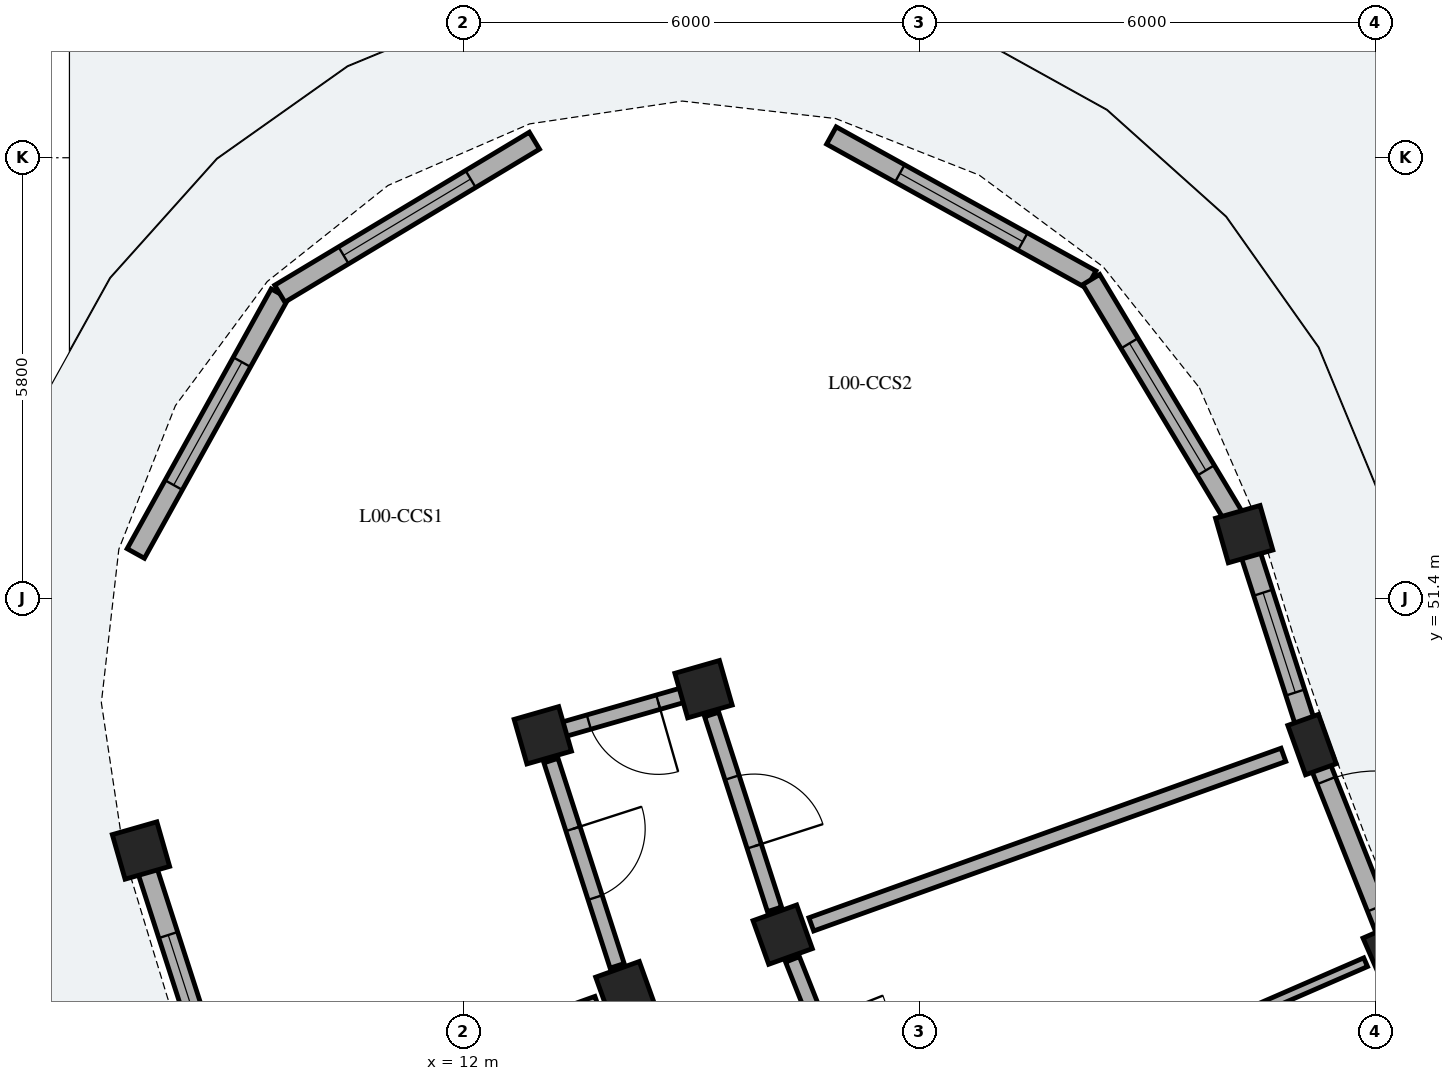
"""IFC4 building model, lengths in metres.
Left out: names, types, materials, properties, quantities, classifications, styles, units other than length and angle.
Written with IfcOpenShell. Run it as: python <this file> out.ifc"""

import sys

from ifc_helpers import new_model, si_unit, direction, frame, frame_2d, origin, origin_2d, place, context, subcontext, project, spatial, rectangle, extrude, element, fill, save


model = new_model("IFC4")
c1 = context("Model", 3, precision=1e-05, world=origin(), true_north=direction((0.0, 1.0)))
c2 = subcontext(c1, "Body", "Model", "MODEL_VIEW")
j1 = project(units=[si_unit("LENGTHUNIT", "METRE"), si_unit("PLANEANGLEUNIT", "RADIAN")], contexts=[c1])
p1 = place(None, origin())
s1 = spatial("IfcSite", under=j1, at=p1, CompositionType="ELEMENT")
p2 = place(p1, origin())
s2 = spatial("IfcBuilding", under=s1, at=p2, CompositionType="ELEMENT")
p3 = place(p2, origin())
s3 = spatial("IfcBuildingStorey", under=s2, at=p3, CompositionType="ELEMENT", Elevation=0.0)
for number, where, z_axis, x_axis in (
    (1, (22.272, 52.248, 0.0), (0.0, 0.0, 1.0), (-0.961, -0.276, 0.0)),
    (2, (15.159, 50.208, 0.0), (0.0, 0.0, 1.0), (-0.961, -0.276, 0.0)),
    (3, (13.044, 49.602, 0.0), (0.0, 0.0, 1.0), (-0.961, -0.276, 0.0)),
    (4, (7.757, 48.086, 0.0), (0.0, 0.0, 1.0), (-0.961, -0.276, 0.0)),
):
    element("IfcColumn", number, at=place(p3, frame(where, z_axis=z_axis, x_axis=x_axis)), inside=s3, PredefinedType="COLUMN", context=c2, shape_type="SweptSolid", body=[
        extrude(rectangle(XDim=0.61, YDim=0.61, at=origin_2d()), origin(), (0.0, 0.0, 1.0), 4.485),
    ])
p4 = place(p3, frame((23.165, 49.479, 0.0), z_axis=(0.0, 0.0, 1.0), x_axis=(-0.941176015256, -0.337916718003, 0.0)))
e5 = element("IfcColumn", 5, at=p4, inside=s3, PredefinedType="PILASTER", context=c2, shape_type="SweptSolid", body=[
    extrude(rectangle(XDim=0.43, YDim=0.69, at=origin_2d()), origin(), (0.0, 0.0, 1.0), 4.485),
])
for number, where, z_axis, x_axis in (
    (6, (16.2, 46.979, 0.0), (0.0, 0.0, 1.0), (-0.941, -0.338, 0.0)),
    (7, (14.129, 46.236, 0.0), (0.0, 0.0, 1.0), (-0.941, -0.338, 0.0)),
    (8, (24.237, 46.776, 0.0), (0.0, 0.0, 1.0), (-0.917, -0.399, 0.0)),
):
    element("IfcColumn", number, at=place(p3, frame(where, z_axis=z_axis, x_axis=x_axis)), inside=s3, PredefinedType="COLUMN", context=c2, shape_type="SweptSolid", body=[
        extrude(rectangle(XDim=0.61, YDim=0.61, at=origin_2d()), origin(), (0.0, 0.0, 1.0), 4.485),
    ])
p5 = place(p3, frame((7.841, 47.824, 0.0), z_axis=(0.0, 0.0, 1.0), x_axis=(0.306963342814, -0.951721338506, 0.0)))
e9 = element("IfcWall", 9, at=p5, inside=s3, PredefinedType="SOLIDWALL", context=c2, shape_type="SweptSolid", body=[
    extrude(rectangle(XDim=3.437, YDim=0.26, at=frame_2d((1.718, 0.0))), origin(), (0.0, 0.0, 1.0), 3.755),
])
p6 = place(p5, frame((0.893, 0.0, 0.55)))
e10 = element("IfcOpeningElement", 10, at=p6, cuts=e9, PredefinedType="OPENING", context=c2, shape_type="SweptSolid", body=[
    extrude(rectangle(XDim=1.65, YDim=1.8, at=frame_2d((0.825, 0.9))), frame((0.0, 0.14, 0.0), z_axis=(0.0, -1.0, 0.0), x_axis=(1.0, 0.0, 0.0)), (0.0, 0.0, 1.0), 0.28),
])
p7 = place(p3, frame((22.356, 51.986, 0.0), z_axis=(0.0, 0.0, 1.0), x_axis=(0.306909552229, -0.951738686169, 0.0)))
e11 = element("IfcWall", 11, at=p7, inside=s3, PredefinedType="SOLIDWALL", context=c2, shape_type="SweptSolid", body=[
    extrude(rectangle(XDim=2.448, YDim=0.26, at=frame_2d((1.224, 0.0))), origin(), (0.0, 0.0, 1.0), 3.755),
])
p8 = place(p7, frame((0.534, 0.0, 0.55)))
e12 = element("IfcOpeningElement", 12, at=p8, cuts=e11, PredefinedType="OPENING", context=c2, shape_type="SweptSolid", body=[
    extrude(rectangle(XDim=1.38, YDim=1.56, at=frame_2d((0.69, 0.78))), frame((0.0, 0.14, 0.0), z_axis=(0.0, -1.0, 0.0), x_axis=(1.0, 0.0, 0.0)), (0.0, 0.0, 1.0), 0.28),
])
p9 = place(p3, frame((23.233, 49.308, 0.0), z_axis=(0.0, 0.0, 1.0), x_axis=(0.368500941406, -0.92962737491, 0.0)))
e13 = element("IfcWall", 13, at=p9, inside=s3, PredefinedType="SOLIDWALL", context=c2, shape_type="SweptSolid", body=[
    extrude(rectangle(XDim=2.449, YDim=0.26, at=frame_2d((1.224, 0.0))), origin(), (0.0, 0.0, 1.0), 3.755),
])
p10 = place(p9, frame((0.324, 0.0, 0.0)))
e14 = element("IfcOpeningElement", 14, at=p10, cuts=e13, PredefinedType="OPENING", context=c2, shape_type="SweptSolid", body=[
    extrude(rectangle(XDim=1.8, YDim=2.15, at=frame_2d((0.9, 1.075))), frame((0.0, 0.14, 0.0), z_axis=(0.0, -1.0, 0.0), x_axis=(1.0, 0.0, 0.0)), (0.0, 0.0, 1.0), 0.28),
])
p11 = place(p3, frame((7.689, 51.993, 0.0), z_axis=(0.0, 0.0, 1.0), x_axis=(0.48481530532, 0.874616555828, 0.0)))
e15 = element("IfcWall", 15, at=p11, inside=s3, PredefinedType="SOLIDWALL", context=c2, shape_type="SweptSolid", body=[
    extrude(rectangle(XDim=3.908, YDim=0.26, at=frame_2d((1.954, 0.0))), origin(), (0.0, 0.0, 1.0), 3.755),
])
p12 = place(p11, frame((1.029, 0.0, 0.4)))
e16 = element("IfcOpeningElement", 16, at=p12, cuts=e15, PredefinedType="OPENING", context=c2, shape_type="SweptSolid", body=[
    extrude(rectangle(XDim=1.85, YDim=1.72, at=frame_2d((0.925, 0.86))), frame((0.0, 0.14, 0.0), z_axis=(0.0, -1.0, 0.0), x_axis=(1.0, 0.0, 0.0)), (0.0, 0.0, 1.0), 0.28),
])
p13 = place(p3, frame((9.583, 55.412, 0.0), z_axis=(0.0, 0.0, 1.0), x_axis=(0.857178568309, 0.515019321998, 0.0)))
e17 = element("IfcWall", 17, at=p13, inside=s3, PredefinedType="SOLIDWALL", context=c2, shape_type="SweptSolid", body=[
    extrude(rectangle(XDim=3.908, YDim=0.26, at=frame_2d((1.954, 0.0))), origin(), (0.0, 0.0, 1.0), 3.755),
])
p14 = place(p13, frame((0.979, 0.0, 0.4)))
e18 = element("IfcOpeningElement", 18, at=p14, cuts=e17, PredefinedType="OPENING", context=c2, shape_type="SweptSolid", body=[
    extrude(rectangle(XDim=1.95, YDim=1.78, at=frame_2d((0.975, 0.89))), frame((0.0, 0.14, 0.0), z_axis=(0.0, -1.0, 0.0), x_axis=(1.0, 0.0, 0.0)), (0.0, 0.0, 1.0), 0.28),
])
p15 = place(p3, frame((16.841, 57.493, 0.0), z_axis=(0.0, 0.0, 1.0), x_axis=(0.874616555828, -0.48481530532, 0.0)))
e19 = element("IfcWall", 19, at=p15, inside=s3, PredefinedType="SOLIDWALL", context=c2, shape_type="SweptSolid", body=[
    extrude(rectangle(XDim=3.908, YDim=0.26, at=frame_2d((1.954, 0.0))), origin(), (0.0, 0.0, 1.0), 3.755),
])
p16 = place(p15, frame((1.029, 0.0, 0.4)))
e20 = element("IfcOpeningElement", 20, at=p16, cuts=e19, PredefinedType="OPENING", context=c2, shape_type="SweptSolid", body=[
    extrude(rectangle(XDim=1.85, YDim=1.72, at=frame_2d((0.925, 0.86))), frame((0.0, 0.14, 0.0), z_axis=(0.0, -1.0, 0.0), x_axis=(1.0, 0.0, 0.0)), (0.0, 0.0, 1.0), 0.28),
])
p17 = place(p3, frame((20.259, 55.598, 0.0), z_axis=(0.0, 0.0, 1.0), x_axis=(0.515037642827, -0.857167560324, 0.0)))
e21 = element("IfcWall", 21, at=p17, inside=s3, PredefinedType="SOLIDWALL", context=c2, shape_type="SweptSolid", body=[
    extrude(rectangle(XDim=3.908, YDim=0.26, at=frame_2d((1.954, 0.0))), origin(), (0.0, 0.0, 1.0), 3.755),
])
p18 = place(p17, frame((0.979, 0.0, 0.4)))
e22 = element("IfcOpeningElement", 22, at=p18, cuts=e21, PredefinedType="OPENING", context=c2, shape_type="SweptSolid", body=[
    extrude(rectangle(XDim=1.95, YDim=1.78, at=frame_2d((0.975, 0.89))), frame((0.0, 0.14, 0.0), z_axis=(0.0, -1.0, 0.0), x_axis=(1.0, 0.0, 0.0)), (0.0, 0.0, 1.0), 0.28),
])
p19 = place(p3, frame((13.151, 49.269, 0.0), z_axis=(0.0, 0.0, 1.0), x_axis=(0.30694495224, -0.951727269912, 0.0)))
e23 = element("IfcWall", 23, at=p19, inside=s3, PredefinedType="PARTITIONING", context=c2, shape_type="SweptSolid", body=[
    extrude(rectangle(XDim=2.837, YDim=0.195, at=frame_2d((1.418, 0.0))), origin(), (0.0, 0.0, 1.0), 3.1),
])
p20 = place(p19, frame((0.944, 0.0, 0.0)))
e24 = element("IfcOpeningElement", 24, at=p20, cuts=e23, PredefinedType="OPENING", context=c2, shape_type="SweptSolid", body=[
    extrude(rectangle(XDim=0.95, YDim=2.13, at=frame_2d((0.475, 1.065))), frame((0.0, 0.107, 0.0), z_axis=(0.0, -1.0, 0.0), x_axis=(1.0, 0.0, 0.0)), (0.0, 0.0, 1.0), 0.215),
])
p21 = place(p3, frame((15.266, 49.875, 0.0), z_axis=(0.0, 0.0, 1.0), x_axis=(0.306883578189, -0.951747061691, 0.0)))
e25 = element("IfcWall", 25, at=p21, inside=s3, PredefinedType="PARTITIONING", context=c2, shape_type="SweptSolid", body=[
    extrude(rectangle(XDim=2.693, YDim=0.195, at=frame_2d((1.346, 0.0))), origin(), (0.0, 0.0, 1.0), 3.1),
])
p22 = place(p21, frame((0.872, 0.0, 0.0)))
e26 = element("IfcOpeningElement", 26, at=p22, cuts=e25, PredefinedType="OPENING", context=c2, shape_type="SweptSolid", body=[
    extrude(rectangle(XDim=0.95, YDim=2.13, at=frame_2d((0.475, 1.065))), frame((0.0, 0.107, 0.0), z_axis=(0.0, -1.0, 0.0), x_axis=(1.0, 0.0, 0.0)), (0.0, 0.0, 1.0), 0.215),
])
p23 = place(p3, frame((13.753, 46.1, 0.0), z_axis=(0.0, 0.0, 1.0), x_axis=(-0.941182387398, -0.337898969591, 0.0)))
e27 = element("IfcWall", 27, at=p23, inside=s3, PredefinedType="PLUMBINGWALL", context=c2, shape_type="SweptSolid", body=[
    extrude(rectangle(XDim=4.7, YDim=0.14, at=frame_2d((2.35, 0.0))), origin(), (0.0, 0.0, 1.0), 3.1),
])
p24 = place(p23, frame((1.925, 0.0, 0.0)))
e28 = element("IfcOpeningElement", 28, at=p24, cuts=e27, PredefinedType="OPENING", context=c2, shape_type="SweptSolid", body=[
    extrude(rectangle(XDim=0.85, YDim=2.05, at=frame_2d((0.425, 1.025))), frame((0.0, 0.08, 0.0), z_axis=(0.0, -1.0, 0.0), x_axis=(1.0, 0.0, 0.0)), (0.0, 0.0, 1.0), 0.16),
])
p25 = place(p3, frame((22.788, 49.344, 0.0), z_axis=(0.0, 0.0, 1.0), x_axis=(-0.941179890997, -0.337905922978, 0.0)))
e29 = element("IfcWall", 29, at=p25, inside=s3, PredefinedType="PARTITIONING", context=c2, shape_type="SweptSolid", body=[
    extrude(rectangle(XDim=6.6, YDim=0.185, at=frame_2d((3.3, 0.0))), origin(), (0.0, 0.0, 1.0), 3.1),
])
p26 = place(p3, frame((16.329, 46.654, 0.0), z_axis=(0.0, 0.0, 1.0), x_axis=(0.368528468945, -0.929616462622, 0.0)))
e30 = element("IfcWall", 30, at=p26, inside=s3, PredefinedType="PARTITIONING", context=c2, shape_type="SweptSolid", body=[
    extrude(rectangle(XDim=2.693, YDim=0.195, at=frame_2d((1.346, 0.0))), origin(), (0.0, 0.0, 1.0), 3.1),
])
p27 = place(p26, frame((0.882, 0.0, 0.0)))
e31 = element("IfcOpeningElement", 31, at=p27, cuts=e30, PredefinedType="OPENING", context=c2, shape_type="SweptSolid", body=[
    extrude(rectangle(XDim=0.93, YDim=2.12, at=frame_2d((0.465, 1.06))), frame((0.0, 0.107, 0.0), z_axis=(0.0, -1.0, 0.0), x_axis=(1.0, 0.0, 0.0)), (0.0, 0.0, 1.0), 0.215),
])
p28 = place(p3, frame((23.87, 46.616, 0.0), z_axis=(0.0, 0.0, 1.0), x_axis=(-0.9170582943, -0.398753162817, 0.0)))
e32 = element("IfcWall", 32, at=p28, inside=s3, PredefinedType="PARTITIONING", context=c2, shape_type="SweptSolid", body=[
    extrude(rectangle(XDim=6.6, YDim=0.125, at=frame_2d((3.3, 0.0))), origin(), (0.0, 0.0, 1.0), 3.1),
])
p29 = place(p28, frame((2.865, 0.0, 0.0)))
e33 = element("IfcOpeningElement", 33, at=p29, cuts=e32, PredefinedType="OPENING", context=c2, shape_type="SweptSolid", body=[
    extrude(rectangle(XDim=0.87, YDim=2.08, at=frame_2d((0.435, 1.04))), frame((0.0, 0.073, 0.0), z_axis=(0.0, -1.0, 0.0), x_axis=(1.0, 0.0, 0.0)), (0.0, 0.0, 1.0), 0.145),
])
p30 = place(p3, frame((15.111, 50.194, 0.0), z_axis=(0.0, 0.0, 1.0), x_axis=(-0.961264701934, -0.275626872449, 0.0)))
e34 = element("IfcWall", 34, at=p30, inside=s3, PredefinedType="PARTITIONING", context=c2, shape_type="SweptSolid", body=[
    extrude(rectangle(XDim=2.1, YDim=0.195, at=frame_2d((1.05, 0.0))), origin(), (0.0, 0.0, 1.0), 3.1),
])
p31 = place(p30, frame((0.57, 0.0, 0.0)))
e35 = element("IfcOpeningElement", 35, at=p31, cuts=e34, PredefinedType="OPENING", context=c2, shape_type="SweptSolid", body=[
    extrude(rectangle(XDim=0.95, YDim=2.13, at=frame_2d((0.475, 1.065))), frame((0.0, 0.107, 0.0), z_axis=(0.0, -1.0, 0.0), x_axis=(1.0, 0.0, 0.0)), (0.0, 0.0, 1.0), 0.215),
])
p32 = place(p6, origin())
e36 = element("IfcWindow", 36, at=p32, inside=s3, PartitioningType="SINGLE_PANEL", PredefinedType="WINDOW", context=c2, shape_type="SweptSolid", body=[
    extrude(rectangle(XDim=1.65, YDim=1.8, at=frame_2d((0.825, 0.9))), frame((0.0, 0.03, 0.0), z_axis=(0.0, -1.0, 0.0), x_axis=(1.0, 0.0, 0.0)), (0.0, 0.0, 1.0), 0.06),
])
fill(e10, e36)
p33 = place(p8, origin())
e37 = element("IfcWindow", 37, at=p33, inside=s3, PartitioningType="SINGLE_PANEL", PredefinedType="WINDOW", context=c2, shape_type="SweptSolid", body=[
    extrude(rectangle(XDim=1.38, YDim=1.56, at=frame_2d((0.69, 0.78))), frame((0.0, 0.03, 0.0), z_axis=(0.0, -1.0, 0.0), x_axis=(1.0, 0.0, 0.0)), (0.0, 0.0, 1.0), 0.06),
])
fill(e12, e37)
p34 = place(p10, origin())
e38 = element("IfcDoor", 38, at=p34, inside=s3, OperationType="DOUBLE_DOOR_SINGLE_SWING", PredefinedType="DOOR", context=c2, shape_type="SweptSolid", body=[
    extrude(rectangle(XDim=1.8, YDim=2.15, at=frame_2d((0.9, 1.075))), frame((0.0, 0.025, 0.0), z_axis=(0.0, -1.0, 0.0), x_axis=(1.0, 0.0, 0.0)), (0.0, 0.0, 1.0), 0.05),
])
fill(e14, e38)
p35 = place(p12, origin())
e39 = element("IfcWindow", 39, at=p35, inside=s3, PartitioningType="SINGLE_PANEL", PredefinedType="WINDOW", context=c2, shape_type="SweptSolid", body=[
    extrude(rectangle(XDim=1.85, YDim=1.72, at=frame_2d((0.925, 0.86))), frame((0.0, 0.03, 0.0), z_axis=(0.0, -1.0, 0.0), x_axis=(1.0, 0.0, 0.0)), (0.0, 0.0, 1.0), 0.06),
])
fill(e16, e39)
p36 = place(p14, origin())
e40 = element("IfcWindow", 40, at=p36, inside=s3, PartitioningType="SINGLE_PANEL", PredefinedType="WINDOW", context=c2, shape_type="SweptSolid", body=[
    extrude(rectangle(XDim=1.95, YDim=1.78, at=frame_2d((0.975, 0.89))), frame((0.0, 0.03, 0.0), z_axis=(0.0, -1.0, 0.0), x_axis=(1.0, 0.0, 0.0)), (0.0, 0.0, 1.0), 0.06),
])
fill(e18, e40)
p37 = place(p16, origin())
e41 = element("IfcWindow", 41, at=p37, inside=s3, PartitioningType="SINGLE_PANEL", PredefinedType="WINDOW", context=c2, shape_type="SweptSolid", body=[
    extrude(rectangle(XDim=1.85, YDim=1.72, at=frame_2d((0.925, 0.86))), frame((0.0, 0.03, 0.0), z_axis=(0.0, -1.0, 0.0), x_axis=(1.0, 0.0, 0.0)), (0.0, 0.0, 1.0), 0.06),
])
fill(e20, e41)
p38 = place(p18, origin())
e42 = element("IfcWindow", 42, at=p38, inside=s3, PartitioningType="SINGLE_PANEL", PredefinedType="WINDOW", context=c2, shape_type="SweptSolid", body=[
    extrude(rectangle(XDim=1.95, YDim=1.78, at=frame_2d((0.975, 0.89))), frame((0.0, 0.03, 0.0), z_axis=(0.0, -1.0, 0.0), x_axis=(1.0, 0.0, 0.0)), (0.0, 0.0, 1.0), 0.06),
])
fill(e22, e42)
p39 = place(p20, origin())
e43 = element("IfcDoor", 43, at=p39, inside=s3, OperationType="SINGLE_SWING_LEFT", PredefinedType="DOOR", context=c2, shape_type="SweptSolid", body=[
    extrude(rectangle(XDim=0.95, YDim=2.13, at=frame_2d((0.475, 1.065))), frame((0.0, 0.025, 0.0), z_axis=(0.0, -1.0, 0.0), x_axis=(1.0, 0.0, 0.0)), (0.0, 0.0, 1.0), 0.05),
])
fill(e24, e43)
p40 = place(p22, origin())
e44 = element("IfcDoor", 44, at=p40, inside=s3, OperationType="SINGLE_SWING_RIGHT", PredefinedType="DOOR", context=c2, shape_type="SweptSolid", body=[
    extrude(rectangle(XDim=0.95, YDim=2.13, at=frame_2d((0.475, 1.065))), frame((0.0, 0.025, 0.0), z_axis=(0.0, -1.0, 0.0), x_axis=(1.0, 0.0, 0.0)), (0.0, 0.0, 1.0), 0.05),
])
fill(e26, e44)
p41 = place(p31, origin())
e45 = element("IfcDoor", 45, at=p41, inside=s3, OperationType="SINGLE_SWING_LEFT", PredefinedType="DOOR", context=c2, shape_type="SweptSolid", body=[
    extrude(rectangle(XDim=0.95, YDim=2.13, at=frame_2d((0.475, 1.065))), frame((0.0, 0.025, 0.0), z_axis=(0.0, -1.0, 0.0), x_axis=(1.0, 0.0, 0.0)), (0.0, 0.0, 1.0), 0.05),
])
fill(e35, e45)
save(model, sys.argv[1])
